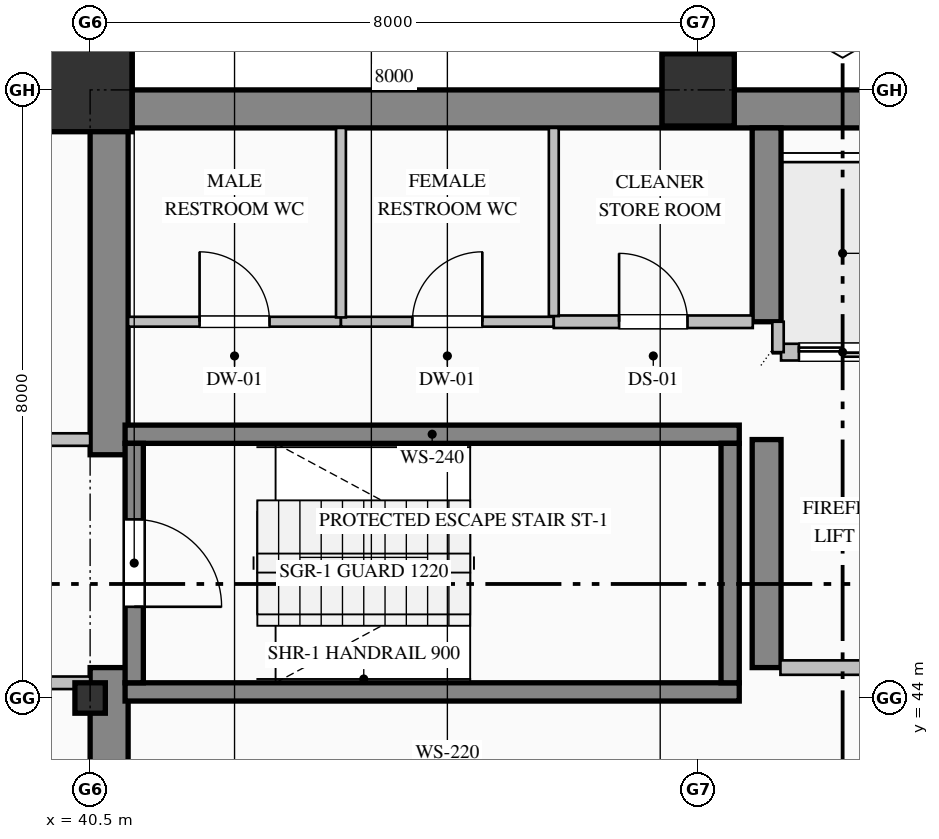
"""IFC4 building model, lengths in metres.
Left out: names, types, materials, properties, quantities, classifications, styles, units other than length and angle.
Written with IfcOpenShell. Run it as: python <this file> out.ifc"""

import sys

from ifc_helpers import new_model, si_unit, direction, frame, frame_2d, origin, origin_2d, place, context, subcontext, project, spatial, rectangle, hollow_rectangle, i_section, extrude, element, fill, save


model = new_model("IFC4")
c1 = context("Model", 3, precision=1e-05, world=origin(), true_north=direction((0.0, 1.0)))
c2 = subcontext(c1, "Body", "Model", "MODEL_VIEW")
j1 = project(units=[si_unit("LENGTHUNIT", "METRE"), si_unit("PLANEANGLEUNIT", "RADIAN")], contexts=[c1])
p1 = place(None, origin())
s1 = spatial("IfcSite", under=j1, at=p1, CompositionType="ELEMENT")
p2 = place(p1, origin())
s2 = spatial("IfcBuilding", under=s1, at=p2, CompositionType="ELEMENT")
p3 = place(p2, frame((0.0, 0.0, 123.0)))
s3 = spatial("IfcBuildingStorey", under=s2, at=p3, CompositionType="ELEMENT", Elevation=123.0)
p4 = place(p3, frame((40.5, 51.75, 0.0), z_axis=(0.0, 0.0, 1.0), x_axis=(1.0, 0.0, 0.0)))
e1 = element("IfcWall", 1, at=p4, inside=s3, PredefinedType="SHEAR", context=c2, shape_type="SweptSolid", body=[
    extrude(rectangle(XDim=23.5, YDim=0.5, at=frame_2d((11.75, 0.0))), origin(), (0.0, 0.0, 1.0), 3.765),
])
p5 = place(p3, frame((40.75, 36.5, 0.0), z_axis=(0.0, 0.0, 1.0), x_axis=(0.0, 1.0, 0.0)))
e2 = element("IfcWall", 2, at=p5, inside=s3, PredefinedType="SHEAR", context=c2, shape_type="SweptSolid", body=[
    extrude(rectangle(XDim=7.9, YDim=0.5, at=frame_2d((3.95, 0.0))), origin(), (0.0, 0.0, 1.0), 3.765),
])
p6 = place(p3, frame((40.75, 47.2, 0.0), z_axis=(0.0, 0.0, 1.0), x_axis=(0.0, 1.0, 0.0)))
e3 = element("IfcWall", 3, at=p6, inside=s3, PredefinedType="SHEAR", context=c2, shape_type="SweptSolid", body=[
    extrude(rectangle(XDim=4.3, YDim=0.5, at=frame_2d((2.15, 0.0))), origin(), (0.0, 0.0, 1.0), 3.765),
])
p7 = place(p3, frame((49.4, 44.4, 0.0), z_axis=(0.0, 0.0, 1.0), x_axis=(0.0, 1.0, 0.0)))
e4 = element("IfcWall", 4, at=p7, inside=s3, PredefinedType="SHEAR", context=c2, shape_type="SweptSolid", body=[
    extrude(rectangle(XDim=3.0, YDim=0.38, at=frame_2d((1.5, 0.0))), origin(), (0.0, 0.0, 1.0), 3.765),
])
p8 = place(p3, frame((49.4, 48.95, 0.0), z_axis=(0.0, 0.0, 1.0), x_axis=(0.0, 1.0, 0.0)))
e5 = element("IfcWall", 5, at=p8, inside=s3, PredefinedType="SHEAR", context=c2, shape_type="SweptSolid", body=[
    extrude(rectangle(XDim=2.55, YDim=0.38, at=frame_2d((1.275, 0.0))), origin(), (0.0, 0.0, 1.0), 3.765),
])
p9 = place(p3, frame((40.5, 44.0, 0.0), z_axis=(0.0, 0.0, 1.0), x_axis=(1.0, 0.0, 0.0)))
e6 = element("IfcColumn", 6, at=p9, inside=s3, PredefinedType="COLUMN", context=c2, shape_type="SweptSolid", body=[
    extrude(i_section(OverallWidth=0.4, OverallDepth=0.4, WebThickness=0.013, FlangeThickness=0.021, FilletRadius=0.022, at=origin_2d()), origin(), (0.0, 0.0, 1.0), 4.0),
])
p10 = place(p3, frame((40.5, 52.0, 0.0), z_axis=(0.0, 0.0, 1.0), x_axis=(1.0, 0.0, 0.0)))
e7 = element("IfcColumn", 7, at=p10, inside=s3, PredefinedType="COLUMN", context=c2, shape_type="SweptSolid", body=[
    extrude(hollow_rectangle(XDim=1.1, YDim=1.1, WallThickness=0.04, at=origin_2d()), origin(), (0.0, 0.0, 1.0), 4.0),
])
p11 = place(p3, frame((48.5, 52.0, 0.0), z_axis=(0.0, 0.0, 1.0), x_axis=(1.0, 0.0, 0.0)))
e8 = element("IfcColumn", 8, at=p11, inside=s3, PredefinedType="COLUMN", context=c2, shape_type="SweptSolid", body=[
    extrude(hollow_rectangle(XDim=0.95, YDim=0.95, WallThickness=0.036, at=origin_2d()), origin(), (0.0, 0.0, 1.0), 4.0),
])
p12 = place(p3, frame((13.0, 51.83, 0.0), z_axis=(0.0, 0.0, 1.0), x_axis=(1.0, 0.0, 0.0)))
e9 = element("IfcWall", 9, at=p12, inside=s3, PredefinedType="SOLIDWALL", context=c2, shape_type="SweptSolid", body=[
    extrude(rectangle(XDim=27.52, YDim=0.34, at=frame_2d((13.76, 0.0))), origin(), (0.0, 0.0, 1.0), 3.265),
])
for number, where, z_axis, x_axis in (
    (10, (40.96, 47.47, 0.0), (0.0, 0.0, 1.0), (1.0, 0.0, 0.0)),
    (11, (49.04, 44.08, 0.0), (0.0, 0.0, 1.0), (-1.0, 0.0, 0.0)),
):
    element("IfcWall", number, at=place(p3, frame(where, z_axis=z_axis, x_axis=x_axis)), inside=s3, PredefinedType="SOLIDWALL", context=c2, shape_type="SweptSolid", body=[
        extrude(rectangle(XDim=8.08, YDim=0.24, at=frame_2d((4.04, 0.0))), origin(), (0.0, 0.0, 1.0), 4.0),
    ])
p13 = place(p3, frame((41.08, 47.35, 0.0), z_axis=(0.0, 0.0, 1.0), x_axis=(0.0, -1.0, 0.0)))
e12 = element("IfcWall", 12, at=p13, inside=s3, PredefinedType="SOLIDWALL", context=c2, shape_type="SweptSolid", body=[
    extrude(rectangle(XDim=3.15, YDim=0.24, at=frame_2d((1.575, 0.0))), origin(), (0.0, 0.0, 1.0), 4.0),
])
p14 = place(p13, frame((1.0, 0.0, 0.0)))
e13 = element("IfcOpeningElement", 13, at=p14, cuts=e12, PredefinedType="OPENING", context=c2, shape_type="SweptSolid", body=[
    extrude(rectangle(XDim=1.15, YDim=2.2, at=frame_2d((0.575, 1.1))), frame((0.0, 0.13, 0.0), z_axis=(0.0, -1.0, 0.0), x_axis=(1.0, 0.0, 0.0)), (0.0, 0.0, 1.0), 0.26),
])
p15 = place(p3, frame((48.92, 44.2, 0.0), z_axis=(0.0, 0.0, 1.0), x_axis=(0.0, 1.0, 0.0)))
e14 = element("IfcWall", 14, at=p15, inside=s3, PredefinedType="SOLIDWALL", context=c2, shape_type="SweptSolid", body=[
    extrude(rectangle(XDim=3.15, YDim=0.24, at=frame_2d((1.575, 0.0))), origin(), (0.0, 0.0, 1.0), 4.0),
])
p16 = place(p3, frame((54.71, 48.55, 0.0), z_axis=(0.0, 0.0, 1.0), x_axis=(-1.0, 0.0, 0.0)))
e15 = element("IfcWall", 15, at=p16, inside=s3, PredefinedType="PARTITIONING", context=c2, shape_type="SweptSolid", body=[
    extrude(rectangle(XDim=5.12, YDim=0.22, at=frame_2d((2.56, 0.0))), origin(), (0.0, 0.0, 1.0), 3.765),
])
p17 = place(p16, frame((3.735, 0.0, 0.0)))
e16 = element("IfcOpeningElement", 16, at=p17, cuts=e15, PredefinedType="OPENING", context=c2, shape_type="SweptSolid", body=[
    extrude(rectangle(XDim=1.15, YDim=2.2, at=frame_2d((0.575, 1.1))), frame((0.0, 0.12, 0.0), z_axis=(0.0, -1.0, 0.0), x_axis=(1.0, 0.0, 0.0)), (0.0, 0.0, 1.0), 0.24),
])
p18 = place(p16, frame((0.935, 0.0, 0.0)))
e17 = element("IfcOpeningElement", 17, at=p18, cuts=e15, PredefinedType="OPENING", context=c2, shape_type="SweptSolid", body=[
    extrude(rectangle(XDim=1.15, YDim=2.2, at=frame_2d((0.575, 1.1))), frame((0.0, 0.12, 0.0), z_axis=(0.0, -1.0, 0.0), x_axis=(1.0, 0.0, 0.0)), (0.0, 0.0, 1.0), 0.24),
])
p19 = place(p3, frame((49.55, 48.55, 0.0), z_axis=(0.0, 0.0, 1.0), x_axis=(0.0, 1.0, 0.0)))
e18 = element("IfcWall", 18, at=p19, inside=s3, PredefinedType="PARTITIONING", context=c2, shape_type="SweptSolid", body=[
    extrude(rectangle(XDim=0.4, YDim=0.15, at=frame_2d((0.2, 0.0))), origin(), (0.0, 0.0, 1.0), 3.765),
])
p20 = place(p3, frame((37.8, 47.4, 0.0), z_axis=(0.0, 0.0, 1.0), x_axis=(1.0, 0.0, 0.0)))
e19 = element("IfcWall", 19, at=p20, inside=s3, PredefinedType="PARTITIONING", context=c2, shape_type="SweptSolid", body=[
    extrude(rectangle(XDim=2.7, YDim=0.165, at=frame_2d((1.35, 0.0))), origin(), (0.0, 0.0, 1.0), 3.765),
])
p21 = place(p20, frame((0.825, 0.0, 0.0)))
e20 = element("IfcOpeningElement", 20, at=p21, cuts=e19, PredefinedType="OPENING", context=c2, shape_type="SweptSolid", body=[
    extrude(rectangle(XDim=1.05, YDim=2.15, at=frame_2d((0.525, 1.075))), frame((0.0, 0.093, 0.0), z_axis=(0.0, -1.0, 0.0), x_axis=(1.0, 0.0, 0.0)), (0.0, 0.0, 1.0), 0.185),
])
p22 = place(p3, frame((40.5, 44.2, 0.0), z_axis=(0.0, 0.0, 1.0), x_axis=(-1.0, 0.0, 0.0)))
e21 = element("IfcWall", 21, at=p22, inside=s3, PredefinedType="PARTITIONING", context=c2, shape_type="SweptSolid", body=[
    extrude(rectangle(XDim=2.7, YDim=0.165, at=frame_2d((1.35, 0.0))), origin(), (0.0, 0.0, 1.0), 3.765),
])
p23 = place(p22, frame((0.825, 0.0, 0.0)))
e22 = element("IfcOpeningElement", 22, at=p23, cuts=e21, PredefinedType="OPENING", context=c2, shape_type="SweptSolid", body=[
    extrude(rectangle(XDim=1.05, YDim=2.15, at=frame_2d((0.525, 1.075))), frame((0.0, 0.093, 0.0), z_axis=(0.0, -1.0, 0.0), x_axis=(1.0, 0.0, 0.0)), (0.0, 0.0, 1.0), 0.185),
])
p24 = place(p3, frame((41.0, 48.95, 0.0), z_axis=(0.0, 0.0, 1.0), x_axis=(1.0, 0.0, 0.0)))
e23 = element("IfcWall", 23, at=p24, inside=s3, PredefinedType="PARTITIONING", context=c2, shape_type="SweptSolid", body=[
    extrude(rectangle(XDim=2.8, YDim=0.13, at=frame_2d((1.4, 0.0))), origin(), (0.0, 0.0, 1.0), 3.765),
])
p25 = place(p24, frame((0.94, 0.0, 0.0)))
e24 = element("IfcOpeningElement", 24, at=p25, cuts=e23, PredefinedType="OPENING", context=c2, shape_type="SweptSolid", body=[
    extrude(rectangle(XDim=0.92, YDim=2.15, at=frame_2d((0.46, 1.075))), frame((0.0, 0.075, 0.0), z_axis=(0.0, -1.0, 0.0), x_axis=(1.0, 0.0, 0.0)), (0.0, 0.0, 1.0), 0.15),
])
p26 = place(p3, frame((43.8, 48.95, 0.0), z_axis=(0.0, 0.0, 1.0), x_axis=(1.0, 0.0, 0.0)))
e25 = element("IfcWall", 25, at=p26, inside=s3, PredefinedType="PARTITIONING", context=c2, shape_type="SweptSolid", body=[
    extrude(rectangle(XDim=2.8, YDim=0.13, at=frame_2d((1.4, 0.0))), origin(), (0.0, 0.0, 1.0), 3.765),
])
p27 = place(p26, frame((0.94, 0.0, 0.0)))
e26 = element("IfcOpeningElement", 26, at=p27, cuts=e25, PredefinedType="OPENING", context=c2, shape_type="SweptSolid", body=[
    extrude(rectangle(XDim=0.92, YDim=2.15, at=frame_2d((0.46, 1.075))), frame((0.0, 0.075, 0.0), z_axis=(0.0, -1.0, 0.0), x_axis=(1.0, 0.0, 0.0)), (0.0, 0.0, 1.0), 0.15),
])
p28 = place(p3, frame((46.6, 48.95, 0.0), z_axis=(0.0, 0.0, 1.0), x_axis=(1.0, 0.0, 0.0)))
e27 = element("IfcWall", 27, at=p28, inside=s3, PredefinedType="PARTITIONING", context=c2, shape_type="SweptSolid", body=[
    extrude(rectangle(XDim=2.618, YDim=0.165, at=frame_2d((1.309, 0.0))), origin(), (0.0, 0.0, 1.0), 3.765),
])
p29 = place(p28, frame((0.859, 0.0, 0.0)))
e28 = element("IfcOpeningElement", 28, at=p29, cuts=e27, PredefinedType="OPENING", context=c2, shape_type="SweptSolid", body=[
    extrude(rectangle(XDim=0.9, YDim=2.15, at=frame_2d((0.45, 1.075))), frame((0.0, 0.093, 0.0), z_axis=(0.0, -1.0, 0.0), x_axis=(1.0, 0.0, 0.0)), (0.0, 0.0, 1.0), 0.185),
])
p30 = place(p3, frame((54.718, 44.4, 0.0), z_axis=(0.0, 0.0, 1.0), x_axis=(-1.0, 0.0, 0.0)))
e29 = element("IfcWall", 29, at=p30, inside=s3, PredefinedType="PARTITIONING", context=c2, shape_type="SweptSolid", body=[
    extrude(rectangle(XDim=5.136, YDim=0.19, at=frame_2d((2.568, 0.0))), origin(), (0.0, 0.0, 1.0), 3.765),
])
p31 = place(p30, frame((2.043, 0.0, 0.0)))
e30 = element("IfcOpeningElement", 30, at=p31, cuts=e29, PredefinedType="OPENING", context=c2, shape_type="SweptSolid", body=[
    extrude(rectangle(XDim=1.05, YDim=2.15, at=frame_2d((0.525, 1.075))), frame((0.0, 0.105, 0.0), z_axis=(0.0, -1.0, 0.0), x_axis=(1.0, 0.0, 0.0)), (0.0, 0.0, 1.0), 0.21),
])
p32 = place(p3, frame((43.8, 51.5, 0.0), z_axis=(0.0, 0.0, 1.0), x_axis=(0.0, -1.0, 0.0)))
e31 = element("IfcWall", 31, at=p32, inside=s3, PredefinedType="PARTITIONING", context=c2, shape_type="SweptSolid", body=[
    extrude(rectangle(XDim=2.493, YDim=0.13, at=frame_2d((1.247, 0.0))), origin(), (0.0, 0.0, 1.0), 3.765),
])
p33 = place(p3, frame((46.6, 51.5, 0.0), z_axis=(0.0, 0.0, 1.0), x_axis=(0.0, -1.0, 0.0)))
e32 = element("IfcWall", 32, at=p33, inside=s3, PredefinedType="PARTITIONING", context=c2, shape_type="SweptSolid", body=[
    extrude(rectangle(XDim=2.476, YDim=0.13, at=frame_2d((1.238, 0.0))), origin(), (0.0, 0.0, 1.0), 3.765),
])
p34 = place(p14, origin())
e33 = element("IfcDoor", 33, at=p34, inside=s3, OperationType="SINGLE_SWING_RIGHT", PredefinedType="DOOR", context=c2, shape_type="SweptSolid", body=[
    extrude(rectangle(XDim=1.15, YDim=2.2, at=frame_2d((0.575, 1.1))), frame((0.0, 0.025, 0.0), z_axis=(0.0, -1.0, 0.0), x_axis=(1.0, 0.0, 0.0)), (0.0, 0.0, 1.0), 0.05),
])
fill(e13, e33)
p35 = place(p17, origin())
e34 = element("IfcDoor", 34, at=p35, inside=s3, OperationType="DOUBLE_DOOR_SLIDING", PredefinedType="DOOR", context=c2, shape_type="SweptSolid", body=[
    extrude(rectangle(XDim=1.15, YDim=2.2, at=frame_2d((0.575, 1.1))), frame((0.0, 0.025, 0.0), z_axis=(0.0, -1.0, 0.0), x_axis=(1.0, 0.0, 0.0)), (0.0, 0.0, 1.0), 0.05),
])
fill(e16, e34)
p36 = place(p25, origin())
e35 = element("IfcDoor", 35, at=p36, inside=s3, OperationType="SINGLE_SWING_LEFT", PredefinedType="DOOR", context=c2, shape_type="SweptSolid", body=[
    extrude(rectangle(XDim=0.92, YDim=2.15, at=frame_2d((0.46, 1.075))), frame((0.0, 0.025, 0.0), z_axis=(0.0, -1.0, 0.0), x_axis=(1.0, 0.0, 0.0)), (0.0, 0.0, 1.0), 0.05),
])
fill(e24, e35)
p37 = place(p27, origin())
e36 = element("IfcDoor", 36, at=p37, inside=s3, OperationType="SINGLE_SWING_RIGHT", PredefinedType="DOOR", context=c2, shape_type="SweptSolid", body=[
    extrude(rectangle(XDim=0.92, YDim=2.15, at=frame_2d((0.46, 1.075))), frame((0.0, 0.025, 0.0), z_axis=(0.0, -1.0, 0.0), x_axis=(1.0, 0.0, 0.0)), (0.0, 0.0, 1.0), 0.05),
])
fill(e26, e36)
p38 = place(p29, origin())
e37 = element("IfcDoor", 37, at=p38, inside=s3, OperationType="SINGLE_SWING_LEFT", PredefinedType="DOOR", context=c2, shape_type="SweptSolid", body=[
    extrude(rectangle(XDim=0.9, YDim=2.15, at=frame_2d((0.45, 1.075))), frame((0.0, 0.025, 0.0), z_axis=(0.0, -1.0, 0.0), x_axis=(1.0, 0.0, 0.0)), (0.0, 0.0, 1.0), 0.05),
])
fill(e28, e37)
save(model, sys.argv[1])
